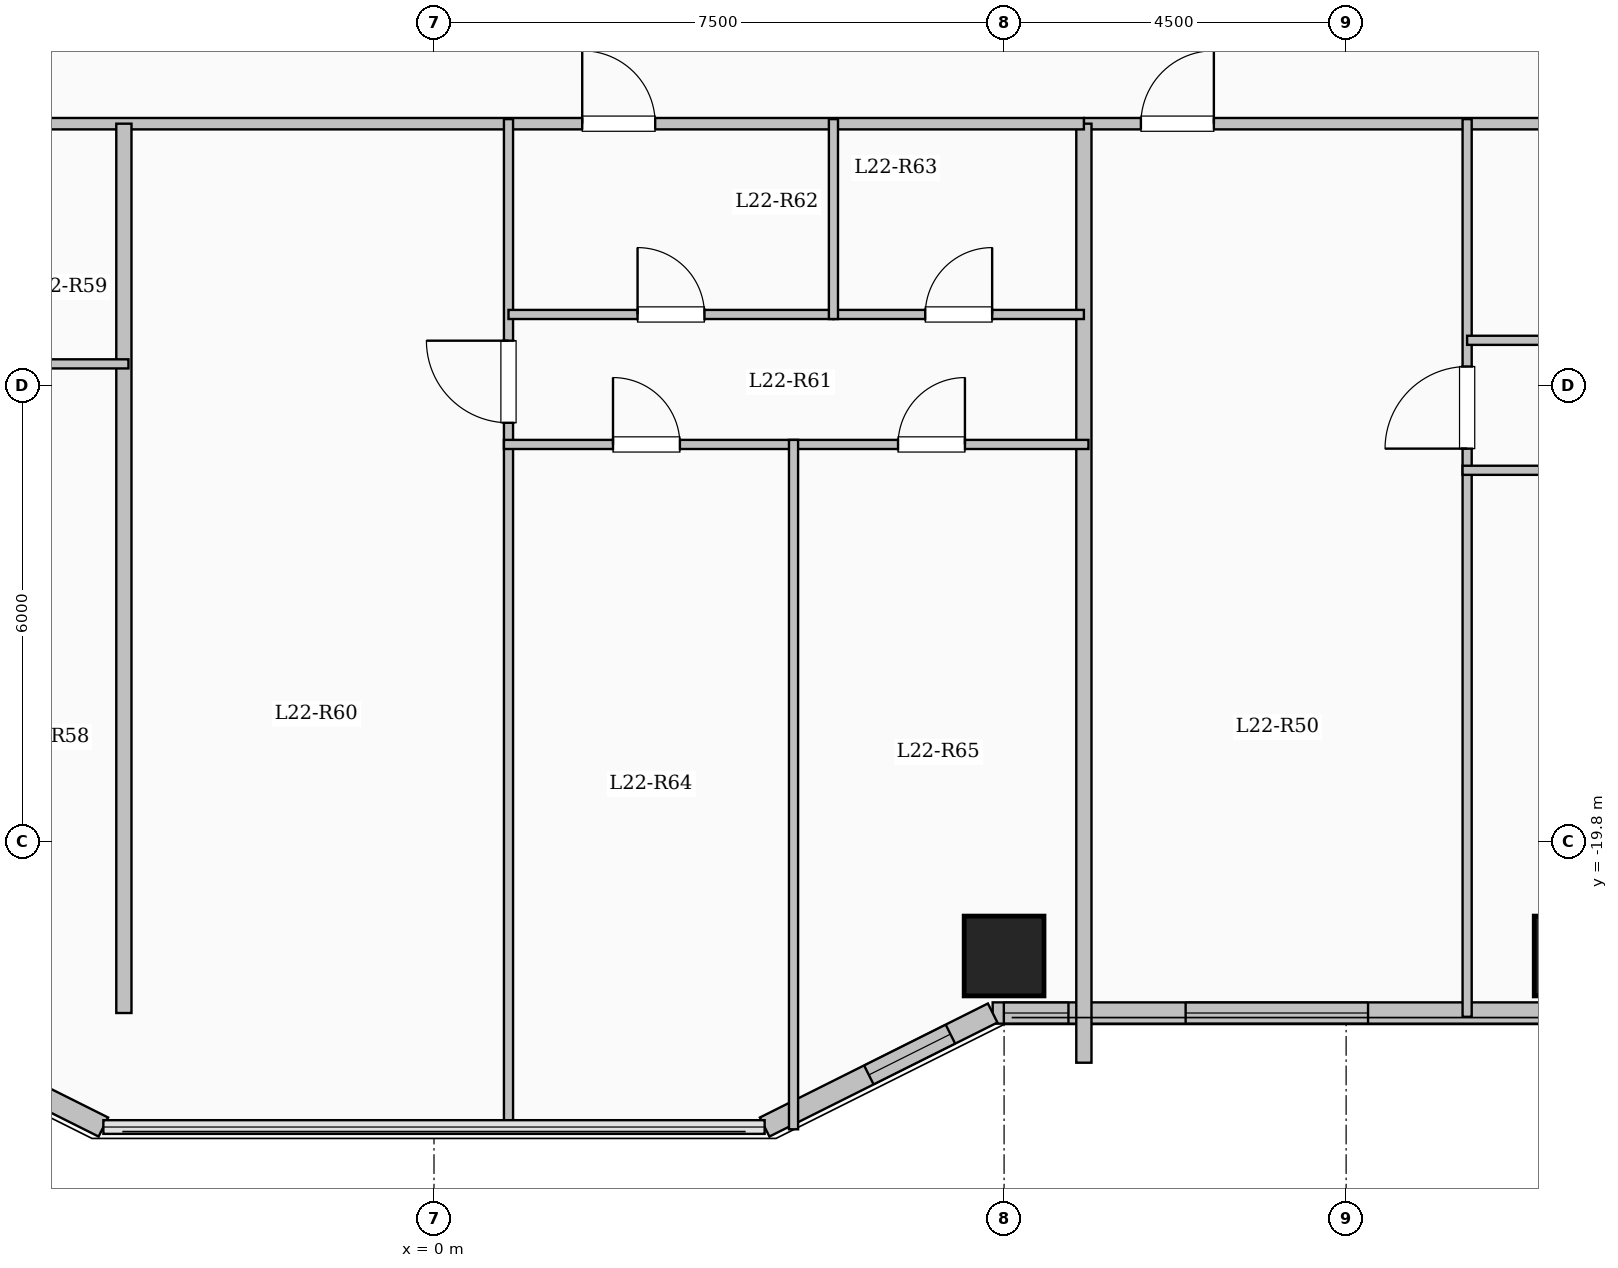
"""IFC4 building model, lengths in metres.
Left out: names, types, materials, properties, quantities, classifications, styles, units other than length and angle.
Written with IfcOpenShell. Run it as: python <this file> out.ifc"""

import sys

from ifc_helpers import new_model, si_unit, direction, frame, frame_2d, origin, origin_2d, place, context, subcontext, project, spatial, rectangle, extrude, element, fill, save


model = new_model("IFC4")
c1 = context("Model", 3, precision=1e-05, world=origin(), true_north=direction((0.0, 1.0)))
c2 = subcontext(c1, "Body", "Model", "MODEL_VIEW")
j1 = project(units=[si_unit("LENGTHUNIT", "METRE"), si_unit("PLANEANGLEUNIT", "RADIAN")], contexts=[c1])
p1 = place(None, origin())
s1 = spatial("IfcSite", under=j1, at=p1, CompositionType="ELEMENT")
p2 = place(p1, origin())
s2 = spatial("IfcBuilding", under=s1, at=p2, CompositionType="ELEMENT")
p3 = place(p2, frame((0.0, 0.0, 85.0)))
s3 = spatial("IfcBuildingStorey", under=s2, at=p3, CompositionType="ELEMENT", Elevation=85.0)
for number, where, z_axis, x_axis in (
    (1, (7.5, -21.3, 0.0), (0.0, 0.0, 1.0), (1.0, 0.0, 0.0)),
    (2, (15.0, -21.3, 0.0), (0.0, 0.0, 1.0), (1.0, 0.0, 0.0)),
):
    element("IfcColumn", number, at=place(p3, frame(where, z_axis=z_axis, x_axis=x_axis)), inside=s3, PredefinedType="COLUMN", context=c2, shape_type="SweptSolid", body=[
        extrude(rectangle(XDim=1.05, YDim=1.05, at=origin_2d()), origin(), (0.0, 0.0, 1.0), 3.35),
    ])
p4 = place(p3, frame((21.15, -22.05, 0.0), z_axis=(0.0, 0.0, 1.0), x_axis=(-1.0, 0.0, 0.0)))
e3 = element("IfcWall", 3, at=p4, inside=s3, PredefinedType="SOLIDWALL", context=c2, shape_type="SweptSolid", body=[
    extrude(rectangle(XDim=13.8, YDim=0.28, at=frame_2d((6.9, 0.0))), origin(), (0.0, 0.0, 1.0), 3.1),
])
p5 = place(p4, frame((1.057, 0.0, 0.9)))
e4 = element("IfcOpeningElement", 4, at=p5, cuts=e3, PredefinedType="OPENING", context=c2, shape_type="SweptSolid", body=[
    extrude(rectangle(XDim=1.8, YDim=1.65, at=frame_2d((0.9, 0.825))), frame((0.0, 0.15, 0.0), z_axis=(0.0, -1.0, 0.0), x_axis=(1.0, 0.0, 0.0)), (0.0, 0.0, 1.0), 0.3),
])
p6 = place(p4, frame((4.796, 0.0, 0.9)))
e5 = element("IfcOpeningElement", 5, at=p6, cuts=e3, PredefinedType="OPENING", context=c2, shape_type="SweptSolid", body=[
    extrude(rectangle(XDim=1.8, YDim=1.65, at=frame_2d((0.9, 0.825))), frame((0.0, 0.15, 0.0), z_axis=(0.0, -1.0, 0.0), x_axis=(1.0, 0.0, 0.0)), (0.0, 0.0, 1.0), 0.3),
])
p7 = place(p4, frame((8.862, 0.0, 0.9)))
e6 = element("IfcOpeningElement", 6, at=p7, cuts=e3, PredefinedType="OPENING", context=c2, shape_type="SweptSolid", body=[
    extrude(rectangle(XDim=2.4, YDim=1.8, at=frame_2d((1.2, 0.9))), frame((0.0, 0.15, 0.0), z_axis=(0.0, -1.0, 0.0), x_axis=(1.0, 0.0, 0.0)), (0.0, 0.0, 1.0), 0.3),
])
p8 = place(p4, frame((12.803, 0.0, 0.95)))
e7 = element("IfcOpeningElement", 7, at=p8, cuts=e3, PredefinedType="OPENING", context=c2, shape_type="SweptSolid", body=[
    extrude(rectangle(XDim=0.85, YDim=1.5, at=frame_2d((0.425, 0.75))), frame((0.0, 0.15, 0.0), z_axis=(0.0, -1.0, 0.0), x_axis=(1.0, 0.0, 0.0)), (0.0, 0.0, 1.0), 0.3),
])
p9 = place(p3, frame((7.35, -22.05, 0.0), z_axis=(0.0, 0.0, 1.0), x_axis=(-0.894427191, -0.4472135955, 0.0)))
e8 = element("IfcWall", 8, at=p9, inside=s3, PredefinedType="SOLIDWALL", context=c2, shape_type="SweptSolid", body=[
    extrude(rectangle(XDim=3.354, YDim=0.28, at=frame_2d((1.677, 0.0))), origin(), (0.0, 0.0, 1.0), 3.1),
])
p10 = place(p9, frame((0.622, 0.0, 0.95)))
e9 = element("IfcOpeningElement", 9, at=p10, cuts=e8, PredefinedType="OPENING", context=c2, shape_type="SweptSolid", body=[
    extrude(rectangle(XDim=1.2, YDim=1.5, at=frame_2d((0.6, 0.75))), frame((0.0, 0.15, 0.0), z_axis=(0.0, -1.0, 0.0), x_axis=(1.0, 0.0, 0.0)), (0.0, 0.0, 1.0), 0.3),
])
p11 = place(p3, frame((-4.35, -23.55, 0.0), z_axis=(0.0, 0.0, 1.0), x_axis=(-0.894427191, 0.4472135955, 0.0)))
e10 = element("IfcWall", 10, at=p11, inside=s3, PredefinedType="SOLIDWALL", context=c2, shape_type="SweptSolid", body=[
    extrude(rectangle(XDim=3.354, YDim=0.28, at=frame_2d((1.677, 0.0))), origin(), (0.0, 0.0, 1.0), 3.1),
])
p12 = place(p11, frame((2.124, 0.0, 0.95)))
e11 = element("IfcOpeningElement", 11, at=p12, cuts=e10, PredefinedType="OPENING", context=c2, shape_type="SweptSolid", body=[
    extrude(rectangle(XDim=0.85, YDim=1.5, at=frame_2d((0.425, 0.75))), frame((0.0, 0.15, 0.0), z_axis=(0.0, -1.0, 0.0), x_axis=(1.0, 0.0, 0.0)), (0.0, 0.0, 1.0), 0.3),
])
p13 = place(p3, frame((8.55, -10.35, 0.0), z_axis=(0.0, 0.0, 1.0), x_axis=(1.0, 0.0, 0.0)))
e12 = element("IfcWall", 12, at=p13, inside=s3, PredefinedType="PARTITIONING", context=c2, shape_type="SweptSolid", body=[
    extrude(rectangle(XDim=12.5, YDim=0.15, at=frame_2d((6.25, 0.0))), origin(), (0.0, 0.0, 1.0), 3.1),
])
p14 = place(p13, frame((0.75, 0.0, 0.0)))
e13 = element("IfcOpeningElement", 13, at=p14, cuts=e12, PredefinedType="OPENING", context=c2, shape_type="SweptSolid", body=[
    extrude(rectangle(XDim=0.96, YDim=2.15, at=frame_2d((0.48, 1.075))), frame((0.0, 0.085, 0.0), z_axis=(0.0, -1.0, 0.0), x_axis=(1.0, 0.0, 0.0)), (0.0, 0.0, 1.0), 0.17),
])
p15 = place(p3, frame((13.592, -22.1, 0.0), z_axis=(0.0, 0.0, 1.0), x_axis=(0.0, 1.0, 0.0)))
e14 = element("IfcWall", 14, at=p15, inside=s3, PredefinedType="PARTITIONING", context=c2, shape_type="SweptSolid", body=[
    extrude(rectangle(XDim=11.81, YDim=0.12, at=frame_2d((5.905, 0.0))), origin(), (0.0, 0.0, 1.0), 3.1),
])
p16 = place(p15, frame((7.475, 0.0, 0.0)))
e15 = element("IfcOpeningElement", 15, at=p16, cuts=e14, PredefinedType="OPENING", context=c2, shape_type="SweptSolid", body=[
    extrude(rectangle(XDim=1.08, YDim=2.15, at=frame_2d((0.54, 1.075))), frame((0.0, 0.07, 0.0), z_axis=(0.0, -1.0, 0.0), x_axis=(1.0, 0.0, 0.0)), (0.0, 0.0, 1.0), 0.14),
])
p17 = place(p3, frame((13.592, -13.2, 0.0), z_axis=(0.0, 0.0, 1.0), x_axis=(1.0, 0.0, 0.0)))
e16 = element("IfcWall", 16, at=p17, inside=s3, PredefinedType="PARTITIONING", context=c2, shape_type="SweptSolid", body=[
    extrude(rectangle(XDim=3.625, YDim=0.12, at=frame_2d((1.812, 0.0))), origin(), (0.0, 0.0, 1.0), 3.1),
])
p18 = place(p17, frame((1.372, 0.0, 0.0)))
e17 = element("IfcOpeningElement", 17, at=p18, cuts=e16, PredefinedType="OPENING", context=c2, shape_type="SweptSolid", body=[
    extrude(rectangle(XDim=0.88, YDim=2.1, at=frame_2d((0.44, 1.05))), frame((0.0, 0.07, 0.0), z_axis=(0.0, -1.0, 0.0), x_axis=(1.0, 0.0, 0.0)), (0.0, 0.0, 1.0), 0.14),
])
p19 = place(p3, frame((13.532, -14.91, 0.0), z_axis=(0.0, 0.0, 1.0), x_axis=(1.0, 0.0, 0.0)))
e18 = element("IfcWall", 18, at=p19, inside=s3, PredefinedType="PARTITIONING", context=c2, shape_type="SweptSolid", body=[
    extrude(rectangle(XDim=7.578, YDim=0.12, at=frame_2d((3.789, 0.0))), origin(), (0.0, 0.0, 1.0), 3.1),
])
p20 = place(p19, frame((1.41, 0.0, 0.0)))
e19 = element("IfcOpeningElement", 19, at=p20, cuts=e18, PredefinedType="OPENING", context=c2, shape_type="SweptSolid", body=[
    extrude(rectangle(XDim=0.88, YDim=2.1, at=frame_2d((0.44, 1.05))), frame((0.0, 0.07, 0.0), z_axis=(0.0, -1.0, 0.0), x_axis=(1.0, 0.0, 0.0)), (0.0, 0.0, 1.0), 0.14),
])
p21 = place(p19, frame((5.109, 0.0, 0.0)))
e20 = element("IfcOpeningElement", 20, at=p21, cuts=e18, PredefinedType="OPENING", context=c2, shape_type="SweptSolid", body=[
    extrude(rectangle(XDim=0.88, YDim=2.1, at=frame_2d((0.44, 1.05))), frame((0.0, 0.07, 0.0), z_axis=(0.0, -1.0, 0.0), x_axis=(1.0, 0.0, 0.0)), (0.0, 0.0, 1.0), 0.14),
])
p22 = place(p3, frame((8.55, -22.704, 0.0), z_axis=(0.0, 0.0, 1.0), x_axis=(0.0, 1.0, 0.0)))
e21 = element("IfcWall", 21, at=p22, inside=s3, PredefinedType="SOLIDWALL", context=c2, shape_type="SweptSolid", body=[
    extrude(rectangle(XDim=12.354, YDim=0.2, at=frame_2d((6.177, 0.0))), origin(), (0.0, 0.0, 1.0), 3.1),
])
p23 = place(p3, frame((-8.55, -10.35, 0.0), z_axis=(0.0, 0.0, 1.0), x_axis=(1.0, 0.0, 0.0)))
e22 = element("IfcWall", 22, at=p23, inside=s3, PredefinedType="PARTITIONING", context=c2, shape_type="SweptSolid", body=[
    extrude(rectangle(XDim=17.1, YDim=0.15, at=frame_2d((8.55, 0.0))), origin(), (0.0, 0.0, 1.0), 3.1),
])
p24 = place(p23, frame((1.15, 0.0, 0.0)))
e23 = element("IfcOpeningElement", 23, at=p24, cuts=e22, PredefinedType="OPENING", context=c2, shape_type="SweptSolid", body=[
    extrude(rectangle(XDim=0.96, YDim=2.15, at=frame_2d((0.48, 1.075))), frame((0.0, 0.085, 0.0), z_axis=(0.0, -1.0, 0.0), x_axis=(1.0, 0.0, 0.0)), (0.0, 0.0, 1.0), 0.17),
])
p25 = place(p23, frame((10.5, 0.0, 0.0)))
e24 = element("IfcOpeningElement", 24, at=p25, cuts=e22, PredefinedType="OPENING", context=c2, shape_type="SweptSolid", body=[
    extrude(rectangle(XDim=0.96, YDim=2.15, at=frame_2d((0.48, 1.075))), frame((0.0, 0.085, 0.0), z_axis=(0.0, -1.0, 0.0), x_axis=(1.0, 0.0, 0.0)), (0.0, 0.0, 1.0), 0.17),
])
p26 = place(p3, frame((-4.08, -22.05, 0.0), z_axis=(0.0, 0.0, 1.0), x_axis=(0.0, 1.0, 0.0)))
e25 = element("IfcWall", 25, at=p26, inside=s3, PredefinedType="SOLIDWALL", context=c2, shape_type="SweptSolid", body=[
    extrude(rectangle(XDim=11.7, YDim=0.2, at=frame_2d((5.85, 0.0))), origin(), (0.0, 0.0, 1.0), 3.1),
])
p27 = place(p3, frame((-6.14, -13.51, 0.0), z_axis=(0.0, 0.0, 1.0), x_axis=(1.0, 0.0, 0.0)))
e26 = element("IfcWall", 26, at=p27, inside=s3, PredefinedType="PARTITIONING", context=c2, shape_type="SweptSolid", body=[
    extrude(rectangle(XDim=2.12, YDim=0.12, at=frame_2d((1.06, 0.0))), origin(), (0.0, 0.0, 1.0), 3.1),
])
p28 = place(p3, frame((0.98, -23.58, 0.0), z_axis=(0.0, 0.0, 1.0), x_axis=(0.0, 1.0, 0.0)))
e27 = element("IfcWall", 27, at=p28, inside=s3, PredefinedType="PARTITIONING", context=c2, shape_type="SweptSolid", body=[
    extrude(rectangle(XDim=13.29, YDim=0.12, at=frame_2d((6.645, 0.0))), origin(), (0.0, 0.0, 1.0), 3.1),
])
p29 = place(p28, frame((9.295, 0.0, 0.0)))
e28 = element("IfcOpeningElement", 28, at=p29, cuts=e27, PredefinedType="OPENING", context=c2, shape_type="SweptSolid", body=[
    extrude(rectangle(XDim=1.08, YDim=2.15, at=frame_2d((0.54, 1.075))), frame((0.0, 0.07, 0.0), z_axis=(0.0, -1.0, 0.0), x_axis=(1.0, 0.0, 0.0)), (0.0, 0.0, 1.0), 0.14),
])
p30 = place(p3, frame((0.98, -12.86, 0.0), z_axis=(0.0, 0.0, 1.0), x_axis=(1.0, 0.0, 0.0)))
e29 = element("IfcWall", 29, at=p30, inside=s3, PredefinedType="PARTITIONING", context=c2, shape_type="SweptSolid", body=[
    extrude(rectangle(XDim=4.275, YDim=0.12, at=frame_2d((2.137, 0.0))), origin(), (0.0, 0.0, 1.0), 3.1),
])
p31 = place(p30, frame((1.698, 0.0, 0.0)))
e30 = element("IfcOpeningElement", 30, at=p31, cuts=e29, PredefinedType="OPENING", context=c2, shape_type="SweptSolid", body=[
    extrude(rectangle(XDim=0.88, YDim=2.1, at=frame_2d((0.44, 1.05))), frame((0.0, 0.07, 0.0), z_axis=(0.0, -1.0, 0.0), x_axis=(1.0, 0.0, 0.0)), (0.0, 0.0, 1.0), 0.14),
])
p32 = place(p3, frame((5.255, -12.86, 0.0), z_axis=(0.0, 0.0, 1.0), x_axis=(1.0, 0.0, 0.0)))
e31 = element("IfcWall", 31, at=p32, inside=s3, PredefinedType="PARTITIONING", context=c2, shape_type="SweptSolid", body=[
    extrude(rectangle(XDim=3.295, YDim=0.12, at=frame_2d((1.647, 0.0))), origin(), (0.0, 0.0, 1.0), 3.1),
])
p33 = place(p32, frame((1.208, 0.0, 0.0)))
e32 = element("IfcOpeningElement", 32, at=p33, cuts=e31, PredefinedType="OPENING", context=c2, shape_type="SweptSolid", body=[
    extrude(rectangle(XDim=0.88, YDim=2.1, at=frame_2d((0.44, 1.05))), frame((0.0, 0.07, 0.0), z_axis=(0.0, -1.0, 0.0), x_axis=(1.0, 0.0, 0.0)), (0.0, 0.0, 1.0), 0.14),
])
p34 = place(p3, frame((0.92, -14.57, 0.0), z_axis=(0.0, 0.0, 1.0), x_axis=(1.0, 0.0, 0.0)))
e33 = element("IfcWall", 33, at=p34, inside=s3, PredefinedType="PARTITIONING", context=c2, shape_type="SweptSolid", body=[
    extrude(rectangle(XDim=7.69, YDim=0.12, at=frame_2d((3.845, 0.0))), origin(), (0.0, 0.0, 1.0), 2.635),
])
p35 = place(p34, frame((1.435, 0.0, 0.0)))
e34 = element("IfcOpeningElement", 34, at=p35, cuts=e33, PredefinedType="OPENING", context=c2, shape_type="SweptSolid", body=[
    extrude(rectangle(XDim=0.88, YDim=2.1, at=frame_2d((0.44, 1.05))), frame((0.0, 0.07, 0.0), z_axis=(0.0, -1.0, 0.0), x_axis=(1.0, 0.0, 0.0)), (0.0, 0.0, 1.0), 0.14),
])
p36 = place(p34, frame((5.185, 0.0, 0.0)))
e35 = element("IfcOpeningElement", 35, at=p36, cuts=e33, PredefinedType="OPENING", context=c2, shape_type="SweptSolid", body=[
    extrude(rectangle(XDim=0.88, YDim=2.1, at=frame_2d((0.44, 1.05))), frame((0.0, 0.07, 0.0), z_axis=(0.0, -1.0, 0.0), x_axis=(1.0, 0.0, 0.0)), (0.0, 0.0, 1.0), 0.14),
])
p37 = place(p3, frame((5.255, -12.92, 0.0), z_axis=(0.0, 0.0, 1.0), x_axis=(0.0, 1.0, 0.0)))
e36 = element("IfcWall", 36, at=p37, inside=s3, PredefinedType="PARTITIONING", context=c2, shape_type="SweptSolid", body=[
    extrude(rectangle(XDim=2.63, YDim=0.12, at=frame_2d((1.315, 0.0))), origin(), (0.0, 0.0, 1.0), 3.1),
])
p38 = place(p3, frame((4.73, -23.58, 0.0), z_axis=(0.0, 0.0, 1.0), x_axis=(0.0, 1.0, 0.0)))
e37 = element("IfcWall", 37, at=p38, inside=s3, PredefinedType="PARTITIONING", context=c2, shape_type="SweptSolid", body=[
    extrude(rectangle(XDim=9.07, YDim=0.12, at=frame_2d((4.535, 0.0))), origin(), (0.0, 0.0, 1.0), 3.1),
])
p39 = place(p7, origin())
e38 = element("IfcWindow", 38, at=p39, inside=s3, PartitioningType="SINGLE_PANEL", PredefinedType="WINDOW", context=c2, shape_type="SweptSolid", body=[
    extrude(rectangle(XDim=2.4, YDim=1.8, at=frame_2d((1.2, 0.9))), frame((0.0, 0.03, 0.0), z_axis=(0.0, -1.0, 0.0), x_axis=(1.0, 0.0, 0.0)), (0.0, 0.0, 1.0), 0.06),
])
fill(e6, e38)
p40 = place(p8, origin())
e39 = element("IfcWindow", 39, at=p40, inside=s3, PartitioningType="SINGLE_PANEL", PredefinedType="WINDOW", context=c2, shape_type="SweptSolid", body=[
    extrude(rectangle(XDim=0.85, YDim=1.5, at=frame_2d((0.425, 0.75))), frame((0.0, 0.03, 0.0), z_axis=(0.0, -1.0, 0.0), x_axis=(1.0, 0.0, 0.0)), (0.0, 0.0, 1.0), 0.06),
])
fill(e7, e39)
p41 = place(p10, origin())
e40 = element("IfcWindow", 40, at=p41, inside=s3, PartitioningType="SINGLE_PANEL", PredefinedType="WINDOW", context=c2, shape_type="SweptSolid", body=[
    extrude(rectangle(XDim=1.2, YDim=1.5, at=frame_2d((0.6, 0.75))), frame((0.0, 0.03, 0.0), z_axis=(0.0, -1.0, 0.0), x_axis=(1.0, 0.0, 0.0)), (0.0, 0.0, 1.0), 0.06),
])
fill(e9, e40)
p42 = place(p14, origin())
e41 = element("IfcDoor", 41, at=p42, inside=s3, OperationType="SINGLE_SWING_RIGHT", PredefinedType="DOOR", context=c2, shape_type="SweptSolid", body=[
    extrude(rectangle(XDim=0.96, YDim=2.15, at=frame_2d((0.48, 1.075))), frame((0.0, 0.025, 0.0), z_axis=(0.0, -1.0, 0.0), x_axis=(1.0, 0.0, 0.0)), (0.0, 0.0, 1.0), 0.05),
])
fill(e13, e41)
p43 = place(p16, origin())
e42 = element("IfcDoor", 42, at=p43, inside=s3, OperationType="SINGLE_SWING_LEFT", PredefinedType="DOOR", context=c2, shape_type="SweptSolid", body=[
    extrude(rectangle(XDim=1.08, YDim=2.15, at=frame_2d((0.54, 1.075))), frame((0.0, 0.025, 0.0), z_axis=(0.0, -1.0, 0.0), x_axis=(1.0, 0.0, 0.0)), (0.0, 0.0, 1.0), 0.05),
])
fill(e15, e42)
p44 = place(p25, origin())
e43 = element("IfcDoor", 43, at=p44, inside=s3, OperationType="SINGLE_SWING_LEFT", PredefinedType="DOOR", context=c2, shape_type="SweptSolid", body=[
    extrude(rectangle(XDim=0.96, YDim=2.15, at=frame_2d((0.48, 1.075))), frame((0.0, 0.025, 0.0), z_axis=(0.0, -1.0, 0.0), x_axis=(1.0, 0.0, 0.0)), (0.0, 0.0, 1.0), 0.05),
])
fill(e24, e43)
p45 = place(p29, origin())
e44 = element("IfcDoor", 44, at=p45, inside=s3, OperationType="SINGLE_SWING_RIGHT", PredefinedType="DOOR", context=c2, shape_type="SweptSolid", body=[
    extrude(rectangle(XDim=1.08, YDim=2.15, at=frame_2d((0.54, 1.075))), frame((0.0, 0.025, 0.0), z_axis=(0.0, -1.0, 0.0), x_axis=(1.0, 0.0, 0.0)), (0.0, 0.0, 1.0), 0.05),
])
fill(e28, e44)
p46 = place(p31, origin())
e45 = element("IfcDoor", 45, at=p46, inside=s3, OperationType="SINGLE_SWING_LEFT", PredefinedType="DOOR", context=c2, shape_type="SweptSolid", body=[
    extrude(rectangle(XDim=0.88, YDim=2.1, at=frame_2d((0.44, 1.05))), frame((0.0, 0.025, 0.0), z_axis=(0.0, -1.0, 0.0), x_axis=(1.0, 0.0, 0.0)), (0.0, 0.0, 1.0), 0.05),
])
fill(e30, e45)
p47 = place(p33, origin())
e46 = element("IfcDoor", 46, at=p47, inside=s3, OperationType="SINGLE_SWING_RIGHT", PredefinedType="DOOR", context=c2, shape_type="SweptSolid", body=[
    extrude(rectangle(XDim=0.88, YDim=2.1, at=frame_2d((0.44, 1.05))), frame((0.0, 0.025, 0.0), z_axis=(0.0, -1.0, 0.0), x_axis=(1.0, 0.0, 0.0)), (0.0, 0.0, 1.0), 0.05),
])
fill(e32, e46)
p48 = place(p35, origin())
e47 = element("IfcDoor", 47, at=p48, inside=s3, OperationType="SINGLE_SWING_LEFT", PredefinedType="DOOR", context=c2, shape_type="SweptSolid", body=[
    extrude(rectangle(XDim=0.88, YDim=2.1, at=frame_2d((0.44, 1.05))), frame((0.0, 0.025, 0.0), z_axis=(0.0, -1.0, 0.0), x_axis=(1.0, 0.0, 0.0)), (0.0, 0.0, 1.0), 0.05),
])
fill(e34, e47)
p49 = place(p36, origin())
e48 = element("IfcDoor", 48, at=p49, inside=s3, OperationType="SINGLE_SWING_RIGHT", PredefinedType="DOOR", context=c2, shape_type="SweptSolid", body=[
    extrude(rectangle(XDim=0.88, YDim=2.1, at=frame_2d((0.44, 1.05))), frame((0.0, 0.025, 0.0), z_axis=(0.0, -1.0, 0.0), x_axis=(1.0, 0.0, 0.0)), (0.0, 0.0, 1.0), 0.05),
])
fill(e35, e48)
save(model, sys.argv[1])
